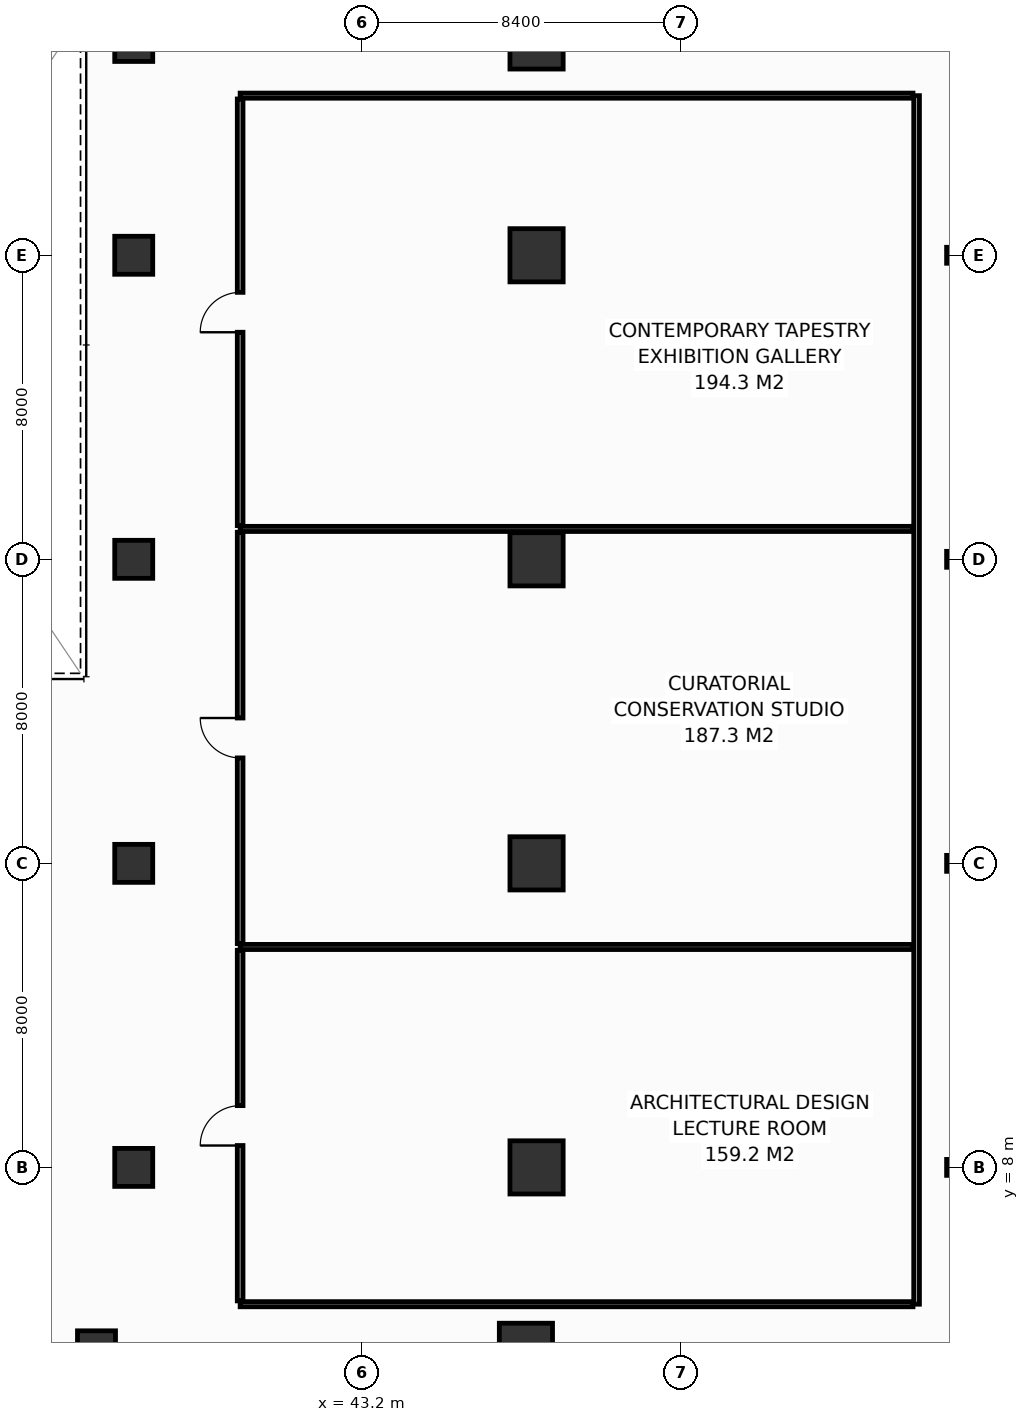
"""IFC4 building model, lengths in metres.
Left out: names, types, materials, properties, quantities, classifications, styles, units other than length and angle.
Written with IfcOpenShell. Run it as: python <this file> out.ifc"""

import sys

from ifc_helpers import new_model, si_unit, direction, frame, frame_2d, origin, origin_2d, place, context, subcontext, project, spatial, rectangle, hollow_rectangle, i_section, extrude, element, fill, save


model = new_model("IFC4")
c1 = context("Model", 3, precision=1e-05, world=origin(), true_north=direction((0.0, 1.0)))
c2 = subcontext(c1, "Body", "Model", "MODEL_VIEW")
j1 = project(units=[si_unit("LENGTHUNIT", "METRE"), si_unit("PLANEANGLEUNIT", "RADIAN")], contexts=[c1])
p1 = place(None, origin())
s1 = spatial("IfcSite", under=j1, at=p1, CompositionType="ELEMENT")
p2 = place(p1, origin())
s2 = spatial("IfcBuilding", under=s1, at=p2, CompositionType="ELEMENT")
p3 = place(p2, frame((0.0, 0.0, 16.8)))
s3 = spatial("IfcBuildingStorey", under=s2, at=p3, CompositionType="ELEMENT", Elevation=16.8)
p4 = place(p3, frame((36.22, 3.2, 0.0), z_axis=(0.0, 0.0, 1.0), x_axis=(1.0, 0.0, 0.0)))
e1 = element("IfcColumn", 1, at=p4, inside=s3, PredefinedType="COLUMN", context=c2, shape_type="SweptSolid", body=[
    extrude(hollow_rectangle(XDim=1.0, YDim=1.0, WallThickness=0.045, at=origin_2d()), origin(), (0.0, 0.0, 1.0), 5.4),
])
p5 = place(p3, frame((47.52, 3.2, 0.0), z_axis=(0.0, 0.0, 1.0), x_axis=(1.0, 0.0, 0.0)))
e2 = element("IfcColumn", 2, at=p5, inside=s3, PredefinedType="COLUMN", context=c2, shape_type="SweptSolid", body=[
    extrude(hollow_rectangle(XDim=1.4, YDim=1.4, WallThickness=0.065, at=origin_2d()), origin(), (0.0, 0.0, 1.0), 5.4),
])
p6 = place(p3, frame((37.2, 8.0, 0.0), z_axis=(0.0, 0.0, 1.0), x_axis=(1.0, 0.0, 0.0)))
e3 = element("IfcColumn", 3, at=p6, inside=s3, PredefinedType="COLUMN", context=c2, shape_type="SweptSolid", body=[
    extrude(hollow_rectangle(XDim=1.0, YDim=1.0, WallThickness=0.045, at=origin_2d()), origin(), (0.0, 0.0, 1.0), 5.4),
])
p7 = place(p3, frame((47.8, 8.0, 0.0), z_axis=(0.0, 0.0, 1.0), x_axis=(1.0, 0.0, 0.0)))
e4 = element("IfcColumn", 4, at=p7, inside=s3, PredefinedType="COLUMN", context=c2, shape_type="SweptSolid", body=[
    extrude(hollow_rectangle(XDim=1.4, YDim=1.4, WallThickness=0.065, at=origin_2d()), origin(), (0.0, 0.0, 1.0), 5.4),
])
p8 = place(p3, frame((37.2, 16.0, 0.0), z_axis=(0.0, 0.0, 1.0), x_axis=(1.0, 0.0, 0.0)))
e5 = element("IfcColumn", 5, at=p8, inside=s3, PredefinedType="COLUMN", context=c2, shape_type="SweptSolid", body=[
    extrude(hollow_rectangle(XDim=1.0, YDim=1.0, WallThickness=0.045, at=origin_2d()), origin(), (0.0, 0.0, 1.0), 5.4),
])
p9 = place(p3, frame((47.8, 16.0, 0.0), z_axis=(0.0, 0.0, 1.0), x_axis=(1.0, 0.0, 0.0)))
e6 = element("IfcColumn", 6, at=p9, inside=s3, PredefinedType="COLUMN", context=c2, shape_type="SweptSolid", body=[
    extrude(hollow_rectangle(XDim=1.4, YDim=1.4, WallThickness=0.065, at=origin_2d()), origin(), (0.0, 0.0, 1.0), 5.4),
])
p10 = place(p3, frame((37.2, 24.0, 0.0), z_axis=(0.0, 0.0, 1.0), x_axis=(1.0, 0.0, 0.0)))
e7 = element("IfcColumn", 7, at=p10, inside=s3, PredefinedType="COLUMN", context=c2, shape_type="SweptSolid", body=[
    extrude(hollow_rectangle(XDim=1.0, YDim=1.0, WallThickness=0.045, at=origin_2d()), origin(), (0.0, 0.0, 1.0), 5.4),
])
p11 = place(p3, frame((47.8, 24.0, 0.0), z_axis=(0.0, 0.0, 1.0), x_axis=(1.0, 0.0, 0.0)))
e8 = element("IfcColumn", 8, at=p11, inside=s3, PredefinedType="COLUMN", context=c2, shape_type="SweptSolid", body=[
    extrude(hollow_rectangle(XDim=1.4, YDim=1.4, WallThickness=0.065, at=origin_2d()), origin(), (0.0, 0.0, 1.0), 5.4),
])
p12 = place(p3, frame((37.2, 32.0, 0.0), z_axis=(0.0, 0.0, 1.0), x_axis=(1.0, 0.0, 0.0)))
e9 = element("IfcColumn", 9, at=p12, inside=s3, PredefinedType="COLUMN", context=c2, shape_type="SweptSolid", body=[
    extrude(hollow_rectangle(XDim=1.0, YDim=1.0, WallThickness=0.045, at=origin_2d()), origin(), (0.0, 0.0, 1.0), 5.4),
])
p13 = place(p3, frame((47.8, 32.0, 0.0), z_axis=(0.0, 0.0, 1.0), x_axis=(1.0, 0.0, 0.0)))
e10 = element("IfcColumn", 10, at=p13, inside=s3, PredefinedType="COLUMN", context=c2, shape_type="SweptSolid", body=[
    extrude(hollow_rectangle(XDim=1.4, YDim=1.4, WallThickness=0.065, at=origin_2d()), origin(), (0.0, 0.0, 1.0), 5.4),
])
p14 = place(p3, frame((37.2, 37.6, 0.0), z_axis=(0.0, 0.0, 1.0), x_axis=(1.0, 0.0, 0.0)))
e11 = element("IfcColumn", 11, at=p14, inside=s3, PredefinedType="COLUMN", context=c2, shape_type="SweptSolid", body=[
    extrude(hollow_rectangle(XDim=1.0, YDim=1.0, WallThickness=0.045, at=origin_2d()), origin(), (0.0, 0.0, 1.0), 5.4),
])
p15 = place(p3, frame((47.8, 37.6, 0.0), z_axis=(0.0, 0.0, 1.0), x_axis=(1.0, 0.0, 0.0)))
e12 = element("IfcColumn", 12, at=p15, inside=s3, PredefinedType="COLUMN", context=c2, shape_type="SweptSolid", body=[
    extrude(hollow_rectangle(XDim=1.4, YDim=1.4, WallThickness=0.065, at=origin_2d()), origin(), (0.0, 0.0, 1.0), 5.4),
])
for number, where, z_axis, x_axis in (
    (13, (58.8, 8.0, 0.0), (0.0, 0.0, 1.0), (1.0, 0.0, 0.0)),
    (14, (58.8, 16.0, 0.0), (0.0, 0.0, 1.0), (1.0, 0.0, 0.0)),
    (15, (58.8, 24.0, 0.0), (0.0, 0.0, 1.0), (1.0, 0.0, 0.0)),
    (16, (58.8, 32.0, 0.0), (0.0, 0.0, 1.0), (1.0, 0.0, 0.0)),
):
    element("IfcColumn", number, at=place(p3, frame(where, z_axis=z_axis, x_axis=x_axis)), inside=s3, PredefinedType="COLUMN", context=c2, shape_type="SweptSolid", body=[
        extrude(i_section(OverallWidth=0.42, OverallDepth=0.42, WebThickness=0.02, FlangeThickness=0.035, FilletRadius=0.022, at=origin_2d()), origin(), (0.0, 0.0, 1.0), 5.4),
    ])
p16 = place(p3, frame((57.8, 4.4, 0.0), z_axis=(0.0, 0.0, 1.0), x_axis=(0.0, 1.0, 0.0)))
e17 = element("IfcWall", 17, at=p16, inside=s3, PredefinedType="PARTITIONING", context=c2, shape_type="SweptSolid", body=[
    extrude(rectangle(XDim=31.8, YDim=0.15, at=frame_2d((15.9, 0.0))), origin(), (0.0, 0.0, 1.0), 4.185),
])
for number, where, z_axis, x_axis in (
    (18, (40.0, 4.4, 0.0), (0.0, 0.0, 1.0), (1.0, 0.0, 0.0)),
    (19, (40.0, 13.8, 0.0), (0.0, 0.0, 1.0), (1.0, 0.0, 0.0)),
    (20, (40.0, 24.8, 0.0), (0.0, 0.0, 1.0), (1.0, 0.0, 0.0)),
    (21, (40.0, 36.2, 0.0), (0.0, 0.0, 1.0), (1.0, 0.0, 0.0)),
):
    element("IfcWall", number, at=place(p3, frame(where, z_axis=z_axis, x_axis=x_axis)), inside=s3, PredefinedType="PARTITIONING", context=c2, shape_type="SweptSolid", body=[
        extrude(rectangle(XDim=17.705, YDim=0.135, at=frame_2d((8.853, 0.0))), origin(), (0.0, 0.0, 1.0), 4.185),
    ])
p17 = place(p3, frame((40.0, 4.488, 0.0), z_axis=(0.0, 0.0, 1.0), x_axis=(0.0, 1.0, 0.0)))
e22 = element("IfcWall", 22, at=p17, inside=s3, PredefinedType="PARTITIONING", context=c2, shape_type="SweptSolid", body=[
    extrude(rectangle(XDim=9.225, YDim=0.15, at=frame_2d((4.612, 0.0))), origin(), (0.0, 0.0, 1.0), 4.185),
])
p18 = place(p17, frame((4.088, 0.0, 0.0)))
e23 = element("IfcOpeningElement", 23, at=p18, cuts=e22, PredefinedType="OPENING", context=c2, shape_type="SweptSolid", body=[
    extrude(rectangle(XDim=1.05, YDim=2.15, at=frame_2d((0.525, 1.075))), frame((0.0, 0.085, 0.0), z_axis=(0.0, -1.0, 0.0), x_axis=(1.0, 0.0, 0.0)), (0.0, 0.0, 1.0), 0.17),
])
p19 = place(p3, frame((40.0, 13.887, 0.0), z_axis=(0.0, 0.0, 1.0), x_axis=(0.0, 1.0, 0.0)))
e24 = element("IfcWall", 24, at=p19, inside=s3, PredefinedType="PARTITIONING", context=c2, shape_type="SweptSolid", body=[
    extrude(rectangle(XDim=10.825, YDim=0.15, at=frame_2d((5.413, 0.0))), origin(), (0.0, 0.0, 1.0), 4.185),
])
p20 = place(p19, frame((4.887, 0.0, 0.0)))
e25 = element("IfcOpeningElement", 25, at=p20, cuts=e24, PredefinedType="OPENING", context=c2, shape_type="SweptSolid", body=[
    extrude(rectangle(XDim=1.05, YDim=2.15, at=frame_2d((0.525, 1.075))), frame((0.0, 0.085, 0.0), z_axis=(0.0, -1.0, 0.0), x_axis=(1.0, 0.0, 0.0)), (0.0, 0.0, 1.0), 0.17),
])
p21 = place(p3, frame((40.0, 24.887, 0.0), z_axis=(0.0, 0.0, 1.0), x_axis=(0.0, 1.0, 0.0)))
e26 = element("IfcWall", 26, at=p21, inside=s3, PredefinedType="PARTITIONING", context=c2, shape_type="SweptSolid", body=[
    extrude(rectangle(XDim=11.225, YDim=0.15, at=frame_2d((5.613, 0.0))), origin(), (0.0, 0.0, 1.0), 4.185),
])
p22 = place(p21, frame((5.087, 0.0, 0.0)))
e27 = element("IfcOpeningElement", 27, at=p22, cuts=e26, PredefinedType="OPENING", context=c2, shape_type="SweptSolid", body=[
    extrude(rectangle(XDim=1.05, YDim=2.15, at=frame_2d((0.525, 1.075))), frame((0.0, 0.085, 0.0), z_axis=(0.0, -1.0, 0.0), x_axis=(1.0, 0.0, 0.0)), (0.0, 0.0, 1.0), 0.17),
])
p23 = place(p18, origin())
e28 = element("IfcDoor", 28, at=p23, inside=s3, OperationType="SINGLE_SWING_LEFT", PredefinedType="DOOR", context=c2, shape_type="SweptSolid", body=[
    extrude(rectangle(XDim=1.05, YDim=2.15, at=frame_2d((0.525, 1.075))), frame((0.0, 0.025, 0.0), z_axis=(0.0, -1.0, 0.0), x_axis=(1.0, 0.0, 0.0)), (0.0, 0.0, 1.0), 0.05),
])
fill(e23, e28)
p24 = place(p20, origin())
e29 = element("IfcDoor", 29, at=p24, inside=s3, OperationType="SINGLE_SWING_RIGHT", PredefinedType="DOOR", context=c2, shape_type="SweptSolid", body=[
    extrude(rectangle(XDim=1.05, YDim=2.15, at=frame_2d((0.525, 1.075))), frame((0.0, 0.025, 0.0), z_axis=(0.0, -1.0, 0.0), x_axis=(1.0, 0.0, 0.0)), (0.0, 0.0, 1.0), 0.05),
])
fill(e25, e29)
p25 = place(p22, origin())
e30 = element("IfcDoor", 30, at=p25, inside=s3, OperationType="SINGLE_SWING_LEFT", PredefinedType="DOOR", context=c2, shape_type="SweptSolid", body=[
    extrude(rectangle(XDim=1.05, YDim=2.15, at=frame_2d((0.525, 1.075))), frame((0.0, 0.025, 0.0), z_axis=(0.0, -1.0, 0.0), x_axis=(1.0, 0.0, 0.0)), (0.0, 0.0, 1.0), 0.05),
])
fill(e27, e30)
save(model, sys.argv[1])
